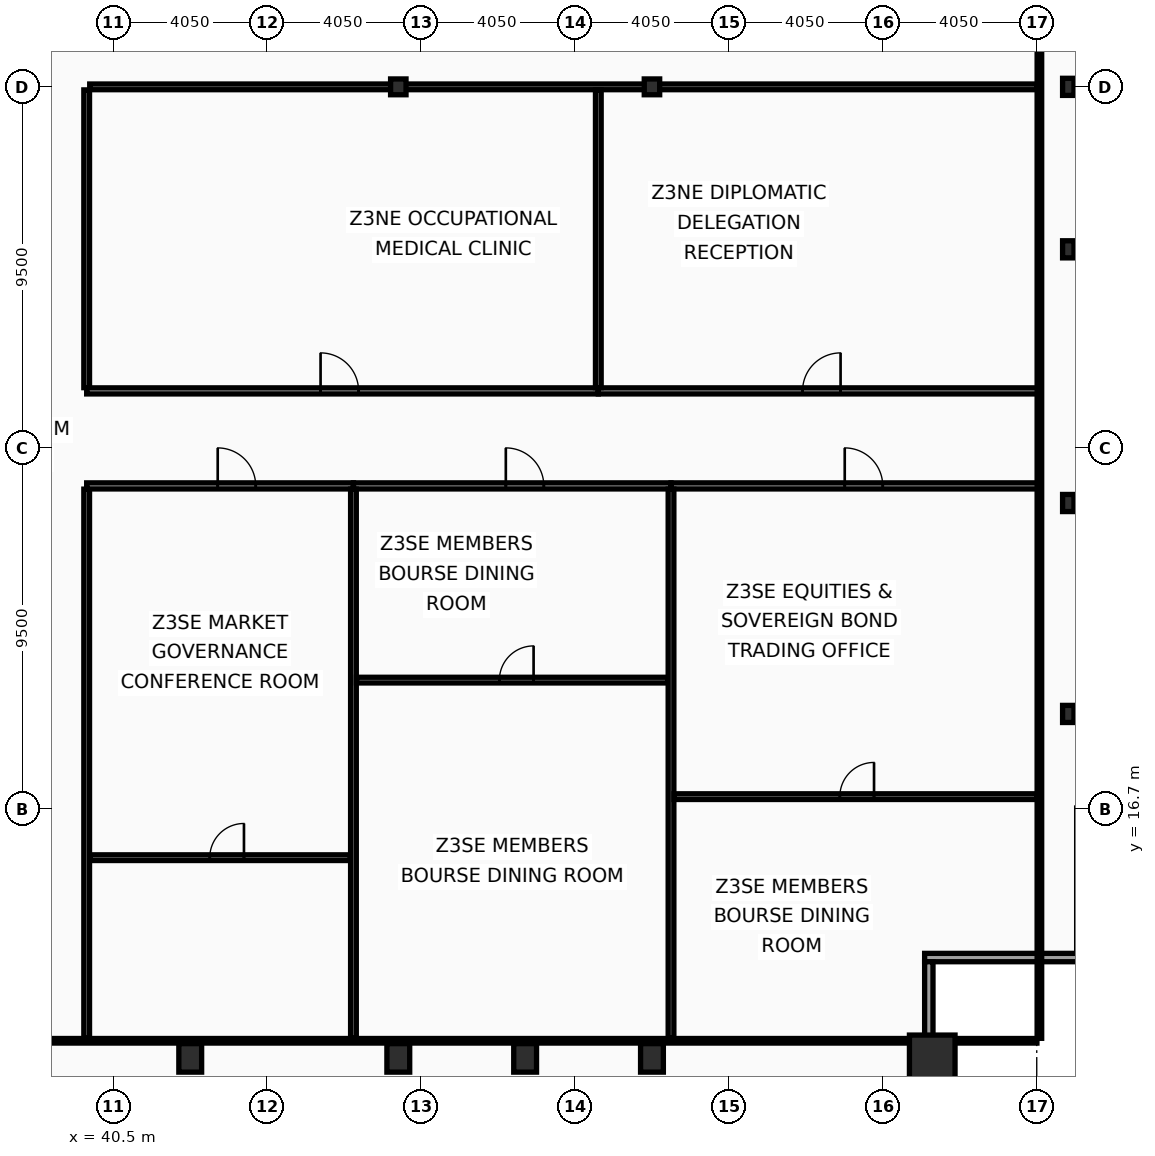
"""IFC4 building model, lengths in metres.
Left out: names, types, materials, properties, quantities, classifications, styles, units other than length and angle.
Written with IfcOpenShell. Run it as: python <this file> out.ifc"""

import sys

from ifc_helpers import new_model, si_unit, direction, frame, frame_2d, origin, origin_2d, place, context, subcontext, project, spatial, rectangle, hollow_rectangle, i_section, extrude, element, fill, save


model = new_model("IFC4")
c1 = context("Model", 3, precision=1e-05, world=origin(), true_north=direction((0.0, 1.0)))
c2 = subcontext(c1, "Body", "Model", "MODEL_VIEW")
j1 = project(units=[si_unit("LENGTHUNIT", "METRE"), si_unit("PLANEANGLEUNIT", "RADIAN")], contexts=[c1])
p1 = place(None, origin())
s1 = spatial("IfcSite", under=j1, at=p1, CompositionType="ELEMENT")
p2 = place(p1, origin())
s2 = spatial("IfcBuilding", under=s1, at=p2, CompositionType="ELEMENT")
p3 = place(p2, frame((0.0, 0.0, 195.8)))
s3 = spatial("IfcBuildingStorey", under=s2, at=p3, CompositionType="ELEMENT", Elevation=195.8)
p4 = place(p3, frame((62.05, 10.15, 0.0), z_axis=(0.0, 0.0, 1.0), x_axis=(1.0, 0.0, 0.0)))
e1 = element("IfcColumn", 1, at=p4, inside=s3, PredefinedType="COLUMN", context=c2, shape_type="SweptSolid", body=[
    extrude(hollow_rectangle(XDim=1.2, YDim=1.2, WallThickness=0.06, at=origin_2d()), origin(), (0.0, 0.0, 1.0), 3.6),
])
for number, where, z_axis, x_axis in (
    (2, (42.525, 10.15, 0.0), (0.0, 0.0, 1.0), (1.0, 0.0, 0.0)),
    (3, (48.0, 10.15, 0.0), (0.0, 0.0, 1.0), (1.0, 0.0, 0.0)),
    (4, (51.337, 10.15, 0.0), (0.0, 0.0, 1.0), (1.0, 0.0, 0.0)),
    (5, (54.675, 10.15, 0.0), (0.0, 0.0, 1.0), (1.0, 0.0, 0.0)),
):
    element("IfcColumn", number, at=place(p3, frame(where, z_axis=z_axis, x_axis=x_axis)), inside=s3, PredefinedType="COLUMN", context=c2, shape_type="SweptSolid", body=[
        extrude(hollow_rectangle(XDim=0.6, YDim=0.75, WallThickness=0.045, at=origin_2d()), origin(), (0.0, 0.0, 1.0), 3.6),
    ])
for number, where, z_axis, x_axis in (
    (6, (65.63, 19.2, 0.0), (0.0, 0.0, 1.0), (1.0, 0.0, 0.0)),
    (7, (65.63, 24.75, 0.0), (0.0, 0.0, 1.0), (1.0, 0.0, 0.0)),
    (8, (65.63, 31.425, 0.0), (0.0, 0.0, 1.0), (1.0, 0.0, 0.0)),
    (9, (65.63, 35.7, 0.0), (0.0, 0.0, 1.0), (1.0, 0.0, 0.0)),
):
    element("IfcColumn", number, at=place(p3, frame(where, z_axis=z_axis, x_axis=x_axis)), inside=s3, PredefinedType="COLUMN", context=c2, shape_type="SweptSolid", body=[
        extrude(i_section(OverallWidth=0.3, OverallDepth=0.45, WebThickness=0.014, FlangeThickness=0.026, at=origin_2d()), origin(), (0.0, 0.0, 1.0), 3.6),
    ])
for number, where, z_axis, x_axis in (
    (10, (48.0, 35.7, 0.0), (0.0, 0.0, 1.0), (1.0, 0.0, 0.0)),
    (11, (54.675, 35.7, 0.0), (0.0, 0.0, 1.0), (1.0, 0.0, 0.0)),
):
    element("IfcColumn", number, at=place(p3, frame(where, z_axis=z_axis, x_axis=x_axis)), inside=s3, PredefinedType="COLUMN", context=c2, shape_type="SweptSolid", body=[
        extrude(i_section(OverallWidth=0.406, OverallDepth=0.416, WebThickness=0.03, FlangeThickness=0.048, at=origin_2d()), origin(), (0.0, 0.0, 1.0), 3.6),
    ])
p5 = place(p3, frame((66.07, 12.79, 0.0), z_axis=(0.0, 0.0, 1.0), x_axis=(-1.0, 0.0, 0.0)))
e12 = element("IfcWall", 12, at=p5, inside=s3, PredefinedType="SOLIDWALL", context=c2, shape_type="SweptSolid", body=[
    extrude(rectangle(XDim=4.22, YDim=0.22, at=frame_2d((2.11, 0.0))), origin(), (0.0, 0.0, 1.0), 2.83),
])
p6 = place(p3, frame((61.96, 12.68, 0.0), z_axis=(0.0, 0.0, 1.0), x_axis=(0.0, -1.0, 0.0)))
e13 = element("IfcWall", 13, at=p6, inside=s3, PredefinedType="SOLIDWALL", context=c2, shape_type="SweptSolid", body=[
    extrude(rectangle(XDim=3.91, YDim=0.22, at=frame_2d((1.955, 0.0))), origin(), (0.0, 0.0, 1.0), 2.83),
])
p7 = place(p3, frame((39.8, 10.665, 0.0), z_axis=(0.0, 0.0, 1.0), x_axis=(0.0, 1.0, 0.0)))
e14 = element("IfcWall", 14, at=p7, inside=s3, PredefinedType="PARTITIONING", context=c2, shape_type="SweptSolid", body=[
    extrude(rectangle(XDim=14.45, YDim=0.15, at=frame_2d((7.225, 0.0))), origin(), (0.0, 0.0, 1.0), 2.98),
])
p8 = place(p3, frame((39.8, 27.785, 0.0), z_axis=(0.0, 0.0, 1.0), x_axis=(0.0, 1.0, 0.0)))
e15 = element("IfcWall", 15, at=p8, inside=s3, PredefinedType="PARTITIONING", context=c2, shape_type="SweptSolid", body=[
    extrude(rectangle(XDim=7.835, YDim=0.15, at=frame_2d((3.917, 0.0))), origin(), (0.0, 0.0, 1.0), 2.98),
])
p9 = place(p3, frame((39.88, 35.7, 0.0), z_axis=(0.0, 0.0, 1.0), x_axis=(1.0, 0.0, 0.0)))
e16 = element("IfcWall", 16, at=p9, inside=s3, PredefinedType="PARTITIONING", context=c2, shape_type="SweptSolid", body=[
    extrude(rectangle(XDim=24.925, YDim=0.15, at=frame_2d((12.462, 0.0))), origin(), (0.0, 0.0, 1.0), 2.73),
])
p10 = place(p3, frame((39.8, 25.2, 0.0), z_axis=(0.0, 0.0, 1.0), x_axis=(1.0, 0.0, 0.0)))
e17 = element("IfcWall", 17, at=p10, inside=s3, PredefinedType="PARTITIONING", context=c2, shape_type="SweptSolid", body=[
    extrude(rectangle(XDim=7.02, YDim=0.16, at=frame_2d((3.51, 0.0))), origin(), (0.0, 0.0, 1.0), 2.73),
])
p11 = place(p10, frame((3.448, 0.0, 0.0)))
e18 = element("IfcOpeningElement", 18, at=p11, cuts=e17, PredefinedType="OPENING", context=c2, shape_type="SweptSolid", body=[
    extrude(rectangle(XDim=1.0, YDim=2.05, at=frame_2d((0.5, 1.025))), frame((0.0, 0.09, 0.0), z_axis=(0.0, -1.0, 0.0), x_axis=(1.0, 0.0, 0.0)), (0.0, 0.0, 1.0), 0.18),
])
p12 = place(p3, frame((39.88, 15.418, 0.0), z_axis=(0.0, 0.0, 1.0), x_axis=(1.0, 0.0, 0.0)))
e19 = element("IfcWall", 19, at=p12, inside=s3, PredefinedType="PARTITIONING", context=c2, shape_type="SweptSolid", body=[
    extrude(rectangle(XDim=6.86, YDim=0.15, at=frame_2d((3.43, 0.0))), origin(), (0.0, 0.0, 1.0), 2.73),
])
p13 = place(p12, frame((3.159, 0.0, 0.0)))
e20 = element("IfcOpeningElement", 20, at=p13, cuts=e19, PredefinedType="OPENING", context=c2, shape_type="SweptSolid", body=[
    extrude(rectangle(XDim=0.9, YDim=2.05, at=frame_2d((0.45, 1.025))), frame((0.0, 0.085, 0.0), z_axis=(0.0, -1.0, 0.0), x_axis=(1.0, 0.0, 0.0)), (0.0, 0.0, 1.0), 0.17),
])
p14 = place(p3, frame((46.82, 25.2, 0.0), z_axis=(0.0, 0.0, 1.0), x_axis=(1.0, 0.0, 0.0)))
e21 = element("IfcWall", 21, at=p14, inside=s3, PredefinedType="PARTITIONING", context=c2, shape_type="SweptSolid", body=[
    extrude(rectangle(XDim=8.357, YDim=0.16, at=frame_2d((4.178, 0.0))), origin(), (0.0, 0.0, 1.0), 2.73),
])
p15 = place(p14, frame((4.01, 0.0, 0.0)))
e22 = element("IfcOpeningElement", 22, at=p15, cuts=e21, PredefinedType="OPENING", context=c2, shape_type="SweptSolid", body=[
    extrude(rectangle(XDim=1.0, YDim=2.05, at=frame_2d((0.5, 1.025))), frame((0.0, 0.09, 0.0), z_axis=(0.0, -1.0, 0.0), x_axis=(1.0, 0.0, 0.0)), (0.0, 0.0, 1.0), 0.18),
])
p16 = place(p3, frame((46.82, 10.665, 0.0), z_axis=(0.0, 0.0, 1.0), x_axis=(0.0, 1.0, 0.0)))
e23 = element("IfcWall", 23, at=p16, inside=s3, PredefinedType="PARTITIONING", context=c2, shape_type="SweptSolid", body=[
    extrude(rectangle(XDim=14.45, YDim=0.15, at=frame_2d((7.225, 0.0))), origin(), (0.0, 0.0, 1.0), 2.98),
])
p17 = place(p3, frame((46.9, 20.09, 0.0), z_axis=(0.0, 0.0, 1.0), x_axis=(1.0, 0.0, 0.0)))
e24 = element("IfcWall", 24, at=p17, inside=s3, PredefinedType="PARTITIONING", context=c2, shape_type="SweptSolid", body=[
    extrude(rectangle(XDim=8.197, YDim=0.15, at=frame_2d((4.098, 0.0))), origin(), (0.0, 0.0, 1.0), 2.73),
])
p18 = place(p17, frame((3.76, 0.0, 0.0)))
e25 = element("IfcOpeningElement", 25, at=p18, cuts=e24, PredefinedType="OPENING", context=c2, shape_type="SweptSolid", body=[
    extrude(rectangle(XDim=0.9, YDim=2.05, at=frame_2d((0.45, 1.025))), frame((0.0, 0.085, 0.0), z_axis=(0.0, -1.0, 0.0), x_axis=(1.0, 0.0, 0.0)), (0.0, 0.0, 1.0), 0.17),
])
p19 = place(p3, frame((55.176, 25.2, 0.0), z_axis=(0.0, 0.0, 1.0), x_axis=(1.0, 0.0, 0.0)))
e26 = element("IfcWall", 26, at=p19, inside=s3, PredefinedType="PARTITIONING", context=c2, shape_type="SweptSolid", body=[
    extrude(rectangle(XDim=9.694, YDim=0.16, at=frame_2d((4.847, 0.0))), origin(), (0.0, 0.0, 1.0), 3.44),
])
p20 = place(p19, frame((4.571, 0.0, 0.0)))
e27 = element("IfcOpeningElement", 27, at=p20, cuts=e26, PredefinedType="OPENING", context=c2, shape_type="SweptSolid", body=[
    extrude(rectangle(XDim=1.0, YDim=2.05, at=frame_2d((0.5, 1.025))), frame((0.0, 0.09, 0.0), z_axis=(0.0, -1.0, 0.0), x_axis=(1.0, 0.0, 0.0)), (0.0, 0.0, 1.0), 0.18),
])
p21 = place(p3, frame((55.176, 10.665, 0.0), z_axis=(0.0, 0.0, 1.0), x_axis=(0.0, 1.0, 0.0)))
e28 = element("IfcWall", 28, at=p21, inside=s3, PredefinedType="PARTITIONING", context=c2, shape_type="SweptSolid", body=[
    extrude(rectangle(XDim=14.45, YDim=0.15, at=frame_2d((7.225, 0.0))), origin(), (0.0, 0.0, 1.0), 2.73),
])
p22 = place(p3, frame((55.256, 17.024, 0.0), z_axis=(0.0, 0.0, 1.0), x_axis=(1.0, 0.0, 0.0)))
e29 = element("IfcWall", 29, at=p22, inside=s3, PredefinedType="PARTITIONING", context=c2, shape_type="SweptSolid", body=[
    extrude(rectangle(XDim=9.549, YDim=0.15, at=frame_2d((4.774, 0.0))), origin(), (0.0, 0.0, 1.0), 2.83),
])
p23 = place(p22, frame((4.362, 0.0, 0.0)))
e30 = element("IfcOpeningElement", 30, at=p23, cuts=e29, PredefinedType="OPENING", context=c2, shape_type="SweptSolid", body=[
    extrude(rectangle(XDim=0.9, YDim=2.05, at=frame_2d((0.45, 1.025))), frame((0.0, 0.085, 0.0), z_axis=(0.0, -1.0, 0.0), x_axis=(1.0, 0.0, 0.0)), (0.0, 0.0, 1.0), 0.17),
])
p24 = place(p3, frame((39.8, 27.7, 0.0), z_axis=(0.0, 0.0, 1.0), x_axis=(1.0, 0.0, 0.0)))
e31 = element("IfcWall", 31, at=p24, inside=s3, PredefinedType="PARTITIONING", context=c2, shape_type="SweptSolid", body=[
    extrude(rectangle(XDim=13.463, YDim=0.16, at=frame_2d((6.732, 0.0))), origin(), (0.0, 0.0, 1.0), 2.73),
])
p25 = place(p24, frame((6.155, 0.0, 0.0)))
e32 = element("IfcOpeningElement", 32, at=p25, cuts=e31, PredefinedType="OPENING", context=c2, shape_type="SweptSolid", body=[
    extrude(rectangle(XDim=1.0, YDim=2.05, at=frame_2d((0.5, 1.025))), frame((0.0, 0.09, 0.0), z_axis=(0.0, -1.0, 0.0), x_axis=(1.0, 0.0, 0.0)), (0.0, 0.0, 1.0), 0.18),
])
p26 = place(p3, frame((53.263, 27.7, 0.0), z_axis=(0.0, 0.0, 1.0), x_axis=(1.0, 0.0, 0.0)))
e33 = element("IfcWall", 33, at=p26, inside=s3, PredefinedType="PARTITIONING", context=c2, shape_type="SweptSolid", body=[
    extrude(rectangle(XDim=11.607, YDim=0.16, at=frame_2d((5.803, 0.0))), origin(), (0.0, 0.0, 1.0), 2.73),
])
p27 = place(p26, frame((5.375, 0.0, 0.0)))
e34 = element("IfcOpeningElement", 34, at=p27, cuts=e33, PredefinedType="OPENING", context=c2, shape_type="SweptSolid", body=[
    extrude(rectangle(XDim=1.0, YDim=2.05, at=frame_2d((0.5, 1.025))), frame((0.0, 0.09, 0.0), z_axis=(0.0, -1.0, 0.0), x_axis=(1.0, 0.0, 0.0)), (0.0, 0.0, 1.0), 0.18),
])
p28 = place(p3, frame((53.263, 27.785, 0.0), z_axis=(0.0, 0.0, 1.0), x_axis=(0.0, 1.0, 0.0)))
e35 = element("IfcWall", 35, at=p28, inside=s3, PredefinedType="PARTITIONING", context=c2, shape_type="SweptSolid", body=[
    extrude(rectangle(XDim=7.835, YDim=0.15, at=frame_2d((3.917, 0.0))), origin(), (0.0, 0.0, 1.0), 2.98),
])
p29 = place(p3, frame((64.87, 10.665, 0.0), z_axis=(0.0, 0.0, 1.0), x_axis=(0.0, 1.0, 0.0)))
e36 = element("IfcWall", 36, at=p29, inside=s3, PredefinedType="PARTITIONING", context=c2, shape_type="SweptSolid", body=[
    extrude(rectangle(XDim=42.11, YDim=0.12, at=frame_2d((21.055, 0.0))), origin(), (0.0, 0.0, 1.0), 2.73),
])
p30 = place(p3, frame((8.095, 10.6, 0.0), z_axis=(0.0, 0.0, 1.0), x_axis=(1.0, 0.0, 0.0)))
e37 = element("IfcWall", 37, at=p30, inside=s3, PredefinedType="PARTITIONING", context=c2, shape_type="SweptSolid", body=[
    extrude(rectangle(XDim=56.71, YDim=0.12, at=frame_2d((28.355, 0.0))), origin(), (0.0, 0.0, 1.0), 2.73),
])
p31 = place(p11, origin())
e38 = element("IfcDoor", 38, at=p31, inside=s3, OperationType="SINGLE_SWING_LEFT", PredefinedType="DOOR", context=c2, shape_type="SweptSolid", body=[
    extrude(rectangle(XDim=1.0, YDim=2.05, at=frame_2d((0.5, 1.025))), frame((0.0, 0.025, 0.0), z_axis=(0.0, -1.0, 0.0), x_axis=(1.0, 0.0, 0.0)), (0.0, 0.0, 1.0), 0.05),
])
fill(e18, e38)
p32 = place(p13, origin())
e39 = element("IfcDoor", 39, at=p32, inside=s3, OperationType="SINGLE_SWING_RIGHT", PredefinedType="DOOR", context=c2, shape_type="SweptSolid", body=[
    extrude(rectangle(XDim=0.9, YDim=2.05, at=frame_2d((0.45, 1.025))), frame((0.0, 0.025, 0.0), z_axis=(0.0, -1.0, 0.0), x_axis=(1.0, 0.0, 0.0)), (0.0, 0.0, 1.0), 0.05),
])
fill(e20, e39)
p33 = place(p15, origin())
e40 = element("IfcDoor", 40, at=p33, inside=s3, OperationType="SINGLE_SWING_LEFT", PredefinedType="DOOR", context=c2, shape_type="SweptSolid", body=[
    extrude(rectangle(XDim=1.0, YDim=2.05, at=frame_2d((0.5, 1.025))), frame((0.0, 0.025, 0.0), z_axis=(0.0, -1.0, 0.0), x_axis=(1.0, 0.0, 0.0)), (0.0, 0.0, 1.0), 0.05),
])
fill(e22, e40)
p34 = place(p18, origin())
e41 = element("IfcDoor", 41, at=p34, inside=s3, OperationType="SINGLE_SWING_RIGHT", PredefinedType="DOOR", context=c2, shape_type="SweptSolid", body=[
    extrude(rectangle(XDim=0.9, YDim=2.05, at=frame_2d((0.45, 1.025))), frame((0.0, 0.025, 0.0), z_axis=(0.0, -1.0, 0.0), x_axis=(1.0, 0.0, 0.0)), (0.0, 0.0, 1.0), 0.05),
])
fill(e25, e41)
p35 = place(p20, origin())
e42 = element("IfcDoor", 42, at=p35, inside=s3, OperationType="SINGLE_SWING_LEFT", PredefinedType="DOOR", context=c2, shape_type="SweptSolid", body=[
    extrude(rectangle(XDim=1.0, YDim=2.05, at=frame_2d((0.5, 1.025))), frame((0.0, 0.025, 0.0), z_axis=(0.0, -1.0, 0.0), x_axis=(1.0, 0.0, 0.0)), (0.0, 0.0, 1.0), 0.05),
])
fill(e27, e42)
p36 = place(p23, origin())
e43 = element("IfcDoor", 43, at=p36, inside=s3, OperationType="SINGLE_SWING_RIGHT", PredefinedType="DOOR", context=c2, shape_type="SweptSolid", body=[
    extrude(rectangle(XDim=0.9, YDim=2.05, at=frame_2d((0.45, 1.025))), frame((0.0, 0.025, 0.0), z_axis=(0.0, -1.0, 0.0), x_axis=(1.0, 0.0, 0.0)), (0.0, 0.0, 1.0), 0.05),
])
fill(e30, e43)
p37 = place(p25, origin())
e44 = element("IfcDoor", 44, at=p37, inside=s3, OperationType="SINGLE_SWING_LEFT", PredefinedType="DOOR", context=c2, shape_type="SweptSolid", body=[
    extrude(rectangle(XDim=1.0, YDim=2.05, at=frame_2d((0.5, 1.025))), frame((0.0, 0.025, 0.0), z_axis=(0.0, -1.0, 0.0), x_axis=(1.0, 0.0, 0.0)), (0.0, 0.0, 1.0), 0.05),
])
fill(e32, e44)
p38 = place(p27, origin())
e45 = element("IfcDoor", 45, at=p38, inside=s3, OperationType="SINGLE_SWING_RIGHT", PredefinedType="DOOR", context=c2, shape_type="SweptSolid", body=[
    extrude(rectangle(XDim=1.0, YDim=2.05, at=frame_2d((0.5, 1.025))), frame((0.0, 0.025, 0.0), z_axis=(0.0, -1.0, 0.0), x_axis=(1.0, 0.0, 0.0)), (0.0, 0.0, 1.0), 0.05),
])
fill(e34, e45)
save(model, sys.argv[1])
